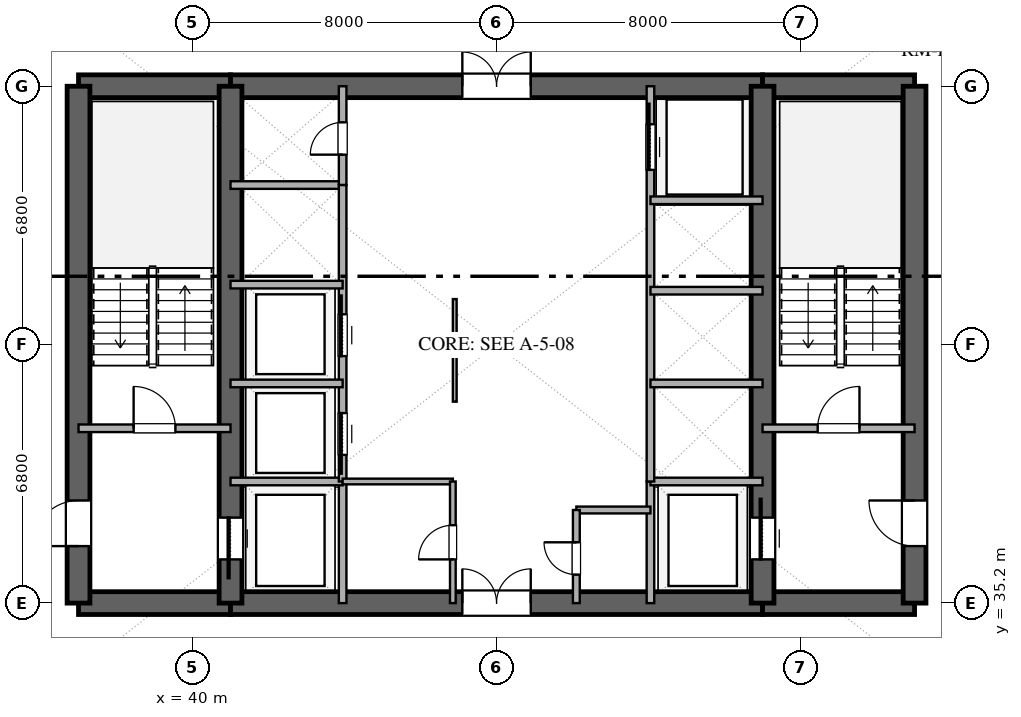
"""IFC4 building model, lengths in metres.
Left out: names, types, materials, properties, quantities, classifications, styles, units other than length and angle.
Written with IfcOpenShell. Run it as: python <this file> out.ifc"""

import sys

from ifc_helpers import new_model, si_unit, direction, frame, frame_2d, origin, place, context, subcontext, project, spatial, rectangle, extrude, element, fill, save


model = new_model("IFC4")
c1 = context("Model", 3, precision=1e-05, world=origin(), true_north=direction((0.0, 1.0)))
c2 = subcontext(c1, "Body", "Model", "MODEL_VIEW")
j1 = project(units=[si_unit("LENGTHUNIT", "METRE"), si_unit("PLANEANGLEUNIT", "RADIAN")], contexts=[c1])
p1 = place(None, origin())
s1 = spatial("IfcSite", under=j1, at=p1, CompositionType="ELEMENT")
p2 = place(p1, origin())
s2 = spatial("IfcBuilding", under=s1, at=p2, CompositionType="ELEMENT")
p3 = place(p2, frame((0.0, 0.0, 28.2)))
s3 = spatial("IfcBuildingStorey", under=s2, at=p3, CompositionType="ELEMENT", Elevation=28.2)
p4 = place(p3, frame((37.0, 35.2, 0.0), z_axis=(0.0, 0.0, 1.0), x_axis=(1.0, 0.0, 0.0)))
e1 = element("IfcWall", 1, at=p4, inside=s3, PredefinedType="SHEAR", context=c2, shape_type="SweptSolid", body=[
    extrude(rectangle(XDim=4.0, YDim=0.6, at=frame_2d((2.0, 0.0))), origin(), (0.0, 0.0, 1.0), 3.38),
])
p5 = place(p3, frame((41.0, 35.2, 0.0), z_axis=(0.0, 0.0, 1.0), x_axis=(1.0, 0.0, 0.0)))
e2 = element("IfcWall", 2, at=p5, inside=s3, PredefinedType="SHEAR", context=c2, shape_type="SweptSolid", body=[
    extrude(rectangle(XDim=14.0, YDim=0.6, at=frame_2d((7.0, 0.0))), origin(), (0.0, 0.0, 1.0), 3.38),
])
p6 = place(p5, frame((6.1, 0.0, 0.0)))
e3 = element("IfcOpeningElement", 3, at=p6, cuts=e2, PredefinedType="OPENING", context=c2, shape_type="SweptSolid", body=[
    extrude(rectangle(XDim=1.8, YDim=2.25, at=frame_2d((0.9, 1.125))), frame((0.0, 0.31, 0.0), z_axis=(0.0, -1.0, 0.0), x_axis=(1.0, 0.0, 0.0)), (0.0, 0.0, 1.0), 0.62),
])
for number, where, z_axis, x_axis in (
    (4, (55.0, 35.2, 0.0), (0.0, 0.0, 1.0), (1.0, 0.0, 0.0)),
    (5, (37.0, 48.8, 0.0), (0.0, 0.0, 1.0), (1.0, 0.0, 0.0)),
):
    element("IfcWall", number, at=place(p3, frame(where, z_axis=z_axis, x_axis=x_axis)), inside=s3, PredefinedType="SHEAR", context=c2, shape_type="SweptSolid", body=[
        extrude(rectangle(XDim=4.0, YDim=0.6, at=frame_2d((2.0, 0.0))), origin(), (0.0, 0.0, 1.0), 3.38),
    ])
p7 = place(p3, frame((41.0, 48.8, 0.0), z_axis=(0.0, 0.0, 1.0), x_axis=(1.0, 0.0, 0.0)))
e6 = element("IfcWall", 6, at=p7, inside=s3, PredefinedType="SHEAR", context=c2, shape_type="SweptSolid", body=[
    extrude(rectangle(XDim=14.0, YDim=0.6, at=frame_2d((7.0, 0.0))), origin(), (0.0, 0.0, 1.0), 3.38),
])
p8 = place(p7, frame((6.1, 0.0, 0.0)))
e7 = element("IfcOpeningElement", 7, at=p8, cuts=e6, PredefinedType="OPENING", context=c2, shape_type="SweptSolid", body=[
    extrude(rectangle(XDim=1.8, YDim=2.25, at=frame_2d((0.9, 1.125))), frame((0.0, 0.31, 0.0), z_axis=(0.0, -1.0, 0.0), x_axis=(1.0, 0.0, 0.0)), (0.0, 0.0, 1.0), 0.62),
])
p9 = place(p3, frame((55.0, 48.8, 0.0), z_axis=(0.0, 0.0, 1.0), x_axis=(1.0, 0.0, 0.0)))
e8 = element("IfcWall", 8, at=p9, inside=s3, PredefinedType="SHEAR", context=c2, shape_type="SweptSolid", body=[
    extrude(rectangle(XDim=4.0, YDim=0.6, at=frame_2d((2.0, 0.0))), origin(), (0.0, 0.0, 1.0), 3.38),
])
p10 = place(p3, frame((37.0, 35.2, 0.0), z_axis=(0.0, 0.0, 1.0), x_axis=(0.0, 1.0, 0.0)))
e9 = element("IfcWall", 9, at=p10, inside=s3, PredefinedType="SHEAR", context=c2, shape_type="SweptSolid", body=[
    extrude(rectangle(XDim=13.6, YDim=0.6, at=frame_2d((6.8, 0.0))), origin(), (0.0, 0.0, 1.0), 3.38),
])
p11 = place(p10, frame((1.5, 0.0, 0.0)))
e10 = element("IfcOpeningElement", 10, at=p11, cuts=e9, PredefinedType="OPENING", context=c2, shape_type="SweptSolid", body=[
    extrude(rectangle(XDim=1.2, YDim=2.15, at=frame_2d((0.6, 1.075))), frame((0.0, 0.31, 0.0), z_axis=(0.0, -1.0, 0.0), x_axis=(1.0, 0.0, 0.0)), (0.0, 0.0, 1.0), 0.62),
])
p12 = place(p3, frame((59.0, 35.2, 0.0), z_axis=(0.0, 0.0, 1.0), x_axis=(0.0, 1.0, 0.0)))
e11 = element("IfcWall", 11, at=p12, inside=s3, PredefinedType="SHEAR", context=c2, shape_type="SweptSolid", body=[
    extrude(rectangle(XDim=13.6, YDim=0.6, at=frame_2d((6.8, 0.0))), origin(), (0.0, 0.0, 1.0), 3.38),
])
p13 = place(p12, frame((1.5, 0.0, 0.0)))
e12 = element("IfcOpeningElement", 12, at=p13, cuts=e11, PredefinedType="OPENING", context=c2, shape_type="SweptSolid", body=[
    extrude(rectangle(XDim=1.2, YDim=2.15, at=frame_2d((0.6, 1.075))), frame((0.0, 0.31, 0.0), z_axis=(0.0, -1.0, 0.0), x_axis=(1.0, 0.0, 0.0)), (0.0, 0.0, 1.0), 0.62),
])
p14 = place(p3, frame((41.0, 35.2, 0.0), z_axis=(0.0, 0.0, 1.0), x_axis=(0.0, 1.0, 0.0)))
e13 = element("IfcWall", 13, at=p14, inside=s3, PredefinedType="SHEAR", context=c2, shape_type="SweptSolid", body=[
    extrude(rectangle(XDim=13.6, YDim=0.6, at=frame_2d((6.8, 0.0))), origin(), (0.0, 0.0, 1.0), 3.38),
])
p15 = place(p14, frame((1.15, 0.0, 0.0)))
e14 = element("IfcOpeningElement", 14, at=p15, cuts=e13, PredefinedType="OPENING", context=c2, shape_type="SweptSolid", body=[
    extrude(rectangle(XDim=1.1, YDim=2.2, at=frame_2d((0.55, 1.1))), frame((0.0, 0.31, 0.0), z_axis=(0.0, -1.0, 0.0), x_axis=(1.0, 0.0, 0.0)), (0.0, 0.0, 1.0), 0.62),
])
p16 = place(p3, frame((55.0, 35.2, 0.0), z_axis=(0.0, 0.0, 1.0), x_axis=(0.0, 1.0, 0.0)))
e15 = element("IfcWall", 15, at=p16, inside=s3, PredefinedType="SHEAR", context=c2, shape_type="SweptSolid", body=[
    extrude(rectangle(XDim=13.6, YDim=0.6, at=frame_2d((6.8, 0.0))), origin(), (0.0, 0.0, 1.0), 3.38),
])
p17 = place(p16, frame((1.15, 0.0, 0.0)))
e16 = element("IfcOpeningElement", 16, at=p17, cuts=e15, PredefinedType="OPENING", context=c2, shape_type="SweptSolid", body=[
    extrude(rectangle(XDim=1.1, YDim=2.2, at=frame_2d((0.55, 1.1))), frame((0.0, 0.31, 0.0), z_axis=(0.0, -1.0, 0.0), x_axis=(1.0, 0.0, 0.0)), (0.0, 0.0, 1.0), 0.62),
])
p18 = place(p3, frame((37.0, 39.8, 0.0), z_axis=(0.0, 0.0, 1.0), x_axis=(1.0, 0.0, 0.0)))
e17 = element("IfcWall", 17, at=p18, inside=s3, PredefinedType="SOLIDWALL", context=c2, shape_type="SweptSolid", body=[
    extrude(rectangle(XDim=4.0, YDim=0.2, at=frame_2d((2.0, 0.0))), origin(), (0.0, 0.0, 1.0), 2.74),
])
p19 = place(p18, frame((1.45, 0.0, 0.0)))
e18 = element("IfcOpeningElement", 18, at=p19, cuts=e17, PredefinedType="OPENING", context=c2, shape_type="SweptSolid", body=[
    extrude(rectangle(XDim=1.1, YDim=2.15, at=frame_2d((0.55, 1.075))), frame((0.0, 0.11, 0.0), z_axis=(0.0, -1.0, 0.0), x_axis=(1.0, 0.0, 0.0)), (0.0, 0.0, 1.0), 0.22),
])
p20 = place(p3, frame((55.0, 39.8, 0.0), z_axis=(0.0, 0.0, 1.0), x_axis=(1.0, 0.0, 0.0)))
e19 = element("IfcWall", 19, at=p20, inside=s3, PredefinedType="SOLIDWALL", context=c2, shape_type="SweptSolid", body=[
    extrude(rectangle(XDim=4.0, YDim=0.2, at=frame_2d((2.0, 0.0))), origin(), (0.0, 0.0, 1.0), 2.74),
])
p21 = place(p20, frame((1.45, 0.0, 0.0)))
e20 = element("IfcOpeningElement", 20, at=p21, cuts=e19, PredefinedType="OPENING", context=c2, shape_type="SweptSolid", body=[
    extrude(rectangle(XDim=1.1, YDim=2.15, at=frame_2d((0.55, 1.075))), frame((0.0, 0.11, 0.0), z_axis=(0.0, -1.0, 0.0), x_axis=(1.0, 0.0, 0.0)), (0.0, 0.0, 1.0), 0.22),
])
p22 = place(p3, frame((43.95, 35.2, 0.0), z_axis=(0.0, 0.0, 1.0), x_axis=(0.0, 1.0, 0.0)))
e21 = element("IfcWall", 21, at=p22, inside=s3, PredefinedType="SOLIDWALL", context=c2, shape_type="SweptSolid", body=[
    extrude(rectangle(XDim=3.2, YDim=0.2, at=frame_2d((1.6, 0.0))), origin(), (0.0, 0.0, 1.0), 2.74),
])
p23 = place(p3, frame((41.0, 38.4, 0.0), z_axis=(0.0, 0.0, 1.0), x_axis=(1.0, 0.0, 0.0)))
e22 = element("IfcWall", 22, at=p23, inside=s3, PredefinedType="SOLIDWALL", context=c2, shape_type="SweptSolid", body=[
    extrude(rectangle(XDim=2.95, YDim=0.2, at=frame_2d((1.475, 0.0))), origin(), (0.0, 0.0, 1.0), 2.74),
])
p24 = place(p3, frame((52.05, 35.2, 0.0), z_axis=(0.0, 0.0, 1.0), x_axis=(0.0, 1.0, 0.0)))
e23 = element("IfcWall", 23, at=p24, inside=s3, PredefinedType="SOLIDWALL", context=c2, shape_type="SweptSolid", body=[
    extrude(rectangle(XDim=3.2, YDim=0.2, at=frame_2d((1.6, 0.0))), origin(), (0.0, 0.0, 1.0), 2.74),
])
for number, where, z_axis, x_axis in (
    (24, (52.05, 38.4, 0.0), (0.0, 0.0, 1.0), (1.0, 0.0, 0.0)),
    (25, (41.0, 46.2, 0.0), (0.0, 0.0, 1.0), (1.0, 0.0, 0.0)),
):
    element("IfcWall", number, at=place(p3, frame(where, z_axis=z_axis, x_axis=x_axis)), inside=s3, PredefinedType="SOLIDWALL", context=c2, shape_type="SweptSolid", body=[
        extrude(rectangle(XDim=2.95, YDim=0.2, at=frame_2d((1.475, 0.0))), origin(), (0.0, 0.0, 1.0), 2.74),
    ])
p25 = place(p3, frame((43.95, 46.2, 0.0), z_axis=(0.0, 0.0, 1.0), x_axis=(0.0, 1.0, 0.0)))
e26 = element("IfcWall", 26, at=p25, inside=s3, PredefinedType="SOLIDWALL", context=c2, shape_type="SweptSolid", body=[
    extrude(rectangle(XDim=2.6, YDim=0.2, at=frame_2d((1.3, 0.0))), origin(), (0.0, 0.0, 1.0), 2.74),
])
p26 = place(p25, frame((0.8, 0.0, 0.0)))
e27 = element("IfcOpeningElement", 27, at=p26, cuts=e26, PredefinedType="OPENING", context=c2, shape_type="SweptSolid", body=[
    extrude(rectangle(XDim=0.85, YDim=2.15, at=frame_2d((0.425, 1.075))), frame((0.0, 0.11, 0.0), z_axis=(0.0, -1.0, 0.0), x_axis=(1.0, 0.0, 0.0)), (0.0, 0.0, 1.0), 0.22),
])
p27 = place(p3, frame((43.95, 38.4, 0.0), z_axis=(0.0, 0.0, 1.0), x_axis=(0.0, 1.0, 0.0)))
e28 = element("IfcWall", 28, at=p27, inside=s3, PredefinedType="SOLIDWALL", context=c2, shape_type="SweptSolid", body=[
    extrude(rectangle(XDim=7.8, YDim=0.2, at=frame_2d((3.9, 0.0))), origin(), (0.0, 0.0, 1.0), 2.74),
])
p28 = place(p27, frame((0.7, 0.0, 0.0)))
e29 = element("IfcOpeningElement", 29, at=p28, cuts=e28, PredefinedType="OPENING", context=c2, shape_type="SweptSolid", body=[
    extrude(rectangle(XDim=1.1, YDim=2.2, at=frame_2d((0.55, 1.1))), frame((0.0, 0.11, 0.0), z_axis=(0.0, -1.0, 0.0), x_axis=(1.0, 0.0, 0.0)), (0.0, 0.0, 1.0), 0.22),
])
p29 = place(p27, frame((3.3, 0.0, 0.0)))
e30 = element("IfcOpeningElement", 30, at=p29, cuts=e28, PredefinedType="OPENING", context=c2, shape_type="SweptSolid", body=[
    extrude(rectangle(XDim=1.1, YDim=2.2, at=frame_2d((0.55, 1.1))), frame((0.0, 0.11, 0.0), z_axis=(0.0, -1.0, 0.0), x_axis=(1.0, 0.0, 0.0)), (0.0, 0.0, 1.0), 0.22),
])
for number, where, z_axis, x_axis in (
    (31, (41.0, 40.98, 0.0), (0.0, 0.0, 1.0), (1.0, 0.0, 0.0)),
    (32, (41.0, 43.58, 0.0), (0.0, 0.0, 1.0), (1.0, 0.0, 0.0)),
):
    element("IfcWall", number, at=place(p3, frame(where, z_axis=z_axis, x_axis=x_axis)), inside=s3, PredefinedType="SOLIDWALL", context=c2, shape_type="SweptSolid", body=[
        extrude(rectangle(XDim=2.95, YDim=0.2, at=frame_2d((1.475, 0.0))), origin(), (0.0, 0.0, 1.0), 2.74),
    ])
p30 = place(p3, frame((52.05, 38.4, 0.0), z_axis=(0.0, 0.0, 1.0), x_axis=(0.0, 1.0, 0.0)))
e33 = element("IfcWall", 33, at=p30, inside=s3, PredefinedType="SOLIDWALL", context=c2, shape_type="SweptSolid", body=[
    extrude(rectangle(XDim=10.4, YDim=0.2, at=frame_2d((5.2, 0.0))), origin(), (0.0, 0.0, 1.0), 2.74),
])
p31 = place(p30, frame((8.2, 0.0, 0.0)))
e34 = element("IfcOpeningElement", 34, at=p31, cuts=e33, PredefinedType="OPENING", context=c2, shape_type="SweptSolid", body=[
    extrude(rectangle(XDim=1.2, YDim=2.2, at=frame_2d((0.6, 1.1))), frame((0.0, 0.11, 0.0), z_axis=(0.0, -1.0, 0.0), x_axis=(1.0, 0.0, 0.0)), (0.0, 0.0, 1.0), 0.22),
])
for number, where, z_axis, x_axis in (
    (35, (52.05, 40.98, 0.0), (0.0, 0.0, 1.0), (1.0, 0.0, 0.0)),
    (36, (52.05, 43.42, 0.0), (0.0, 0.0, 1.0), (1.0, 0.0, 0.0)),
    (37, (52.05, 45.8, 0.0), (0.0, 0.0, 1.0), (1.0, 0.0, 0.0)),
):
    element("IfcWall", number, at=place(p3, frame(where, z_axis=z_axis, x_axis=x_axis)), inside=s3, PredefinedType="SOLIDWALL", context=c2, shape_type="SweptSolid", body=[
        extrude(rectangle(XDim=2.95, YDim=0.2, at=frame_2d((1.475, 0.0))), origin(), (0.0, 0.0, 1.0), 2.74),
    ])
p32 = place(p3, frame((43.95, 38.4, 0.0), z_axis=(0.0, 0.0, 1.0), x_axis=(1.0, 0.0, 0.0)))
e38 = element("IfcWall", 38, at=p32, inside=s3, PredefinedType="PARTITIONING", context=c2, shape_type="SweptSolid", body=[
    extrude(rectangle(XDim=2.9, YDim=0.15, at=frame_2d((1.45, 0.0))), origin(), (0.0, 0.0, 1.0), 2.74),
])
p33 = place(p3, frame((46.85, 35.2, 0.0), z_axis=(0.0, 0.0, 1.0), x_axis=(0.0, 1.0, 0.0)))
e39 = element("IfcWall", 39, at=p33, inside=s3, PredefinedType="PARTITIONING", context=c2, shape_type="SweptSolid", body=[
    extrude(rectangle(XDim=3.2, YDim=0.15, at=frame_2d((1.6, 0.0))), origin(), (0.0, 0.0, 1.0), 2.74),
])
p34 = place(p33, frame((1.15, 0.0, 0.0)))
e40 = element("IfcOpeningElement", 40, at=p34, cuts=e39, PredefinedType="OPENING", context=c2, shape_type="SweptSolid", body=[
    extrude(rectangle(XDim=0.9, YDim=2.15, at=frame_2d((0.45, 1.075))), frame((0.0, 0.085, 0.0), z_axis=(0.0, -1.0, 0.0), x_axis=(1.0, 0.0, 0.0)), (0.0, 0.0, 1.0), 0.17),
])
p35 = place(p3, frame((50.1, 37.65, 0.0), z_axis=(0.0, 0.0, 1.0), x_axis=(1.0, 0.0, 0.0)))
e41 = element("IfcWall", 41, at=p35, inside=s3, PredefinedType="PLUMBINGWALL", context=c2, shape_type="SweptSolid", body=[
    extrude(rectangle(XDim=1.95, YDim=0.18, at=frame_2d((0.975, 0.0))), origin(), (0.0, 0.0, 1.0), 2.74),
])
p36 = place(p3, frame((50.1, 35.2, 0.0), z_axis=(0.0, 0.0, 1.0), x_axis=(0.0, 1.0, 0.0)))
e42 = element("IfcWall", 42, at=p36, inside=s3, PredefinedType="PLUMBINGWALL", context=c2, shape_type="SweptSolid", body=[
    extrude(rectangle(XDim=2.45, YDim=0.18, at=frame_2d((1.225, 0.0))), origin(), (0.0, 0.0, 1.0), 2.74),
])
p37 = place(p36, frame((0.75, 0.0, 0.0)))
e43 = element("IfcOpeningElement", 43, at=p37, cuts=e42, PredefinedType="OPENING", context=c2, shape_type="SweptSolid", body=[
    extrude(rectangle(XDim=0.85, YDim=2.1, at=frame_2d((0.425, 1.05))), frame((0.0, 0.1, 0.0), z_axis=(0.0, -1.0, 0.0), x_axis=(1.0, 0.0, 0.0)), (0.0, 0.0, 1.0), 0.2),
])
p38 = place(p3, frame((46.9, 40.5, 0.0), z_axis=(0.0, 0.0, 1.0), x_axis=(0.0, 1.0, 0.0)))
e44 = element("IfcWall", 44, at=p38, inside=s3, PredefinedType="MOVABLE", context=c2, shape_type="SweptSolid", body=[
    extrude(rectangle(XDim=2.7, YDim=0.1, at=frame_2d((1.35, 0.0))), origin(), (0.0, 0.0, 1.0), 2.74),
])
p39 = place(p15, origin())
e45 = element("IfcDoor", 45, at=p39, inside=s3, OperationType="SLIDING_TO_LEFT", PredefinedType="DOOR", context=c2, shape_type="SweptSolid", body=[
    extrude(rectangle(XDim=1.1, YDim=2.2, at=frame_2d((0.55, 1.1))), frame((0.0, 0.025, 0.0), z_axis=(0.0, -1.0, 0.0), x_axis=(1.0, 0.0, 0.0)), (0.0, 0.0, 1.0), 0.05),
])
fill(e14, e45)
p40 = place(p17, origin())
e46 = element("IfcDoor", 46, at=p40, inside=s3, OperationType="SLIDING_TO_RIGHT", PredefinedType="DOOR", context=c2, shape_type="SweptSolid", body=[
    extrude(rectangle(XDim=1.1, YDim=2.2, at=frame_2d((0.55, 1.1))), frame((0.0, 0.025, 0.0), z_axis=(0.0, -1.0, 0.0), x_axis=(1.0, 0.0, 0.0)), (0.0, 0.0, 1.0), 0.05),
])
fill(e16, e46)
p41 = place(p11, origin())
e47 = element("IfcDoor", 47, at=p41, inside=s3, OperationType="SINGLE_SWING_LEFT", PredefinedType="DOOR", context=c2, shape_type="SweptSolid", body=[
    extrude(rectangle(XDim=1.2, YDim=2.15, at=frame_2d((0.6, 1.075))), frame((0.0, 0.025, 0.0), z_axis=(0.0, -1.0, 0.0), x_axis=(1.0, 0.0, 0.0)), (0.0, 0.0, 1.0), 0.05),
])
fill(e10, e47)
p42 = place(p13, origin())
e48 = element("IfcDoor", 48, at=p42, inside=s3, OperationType="SINGLE_SWING_RIGHT", PredefinedType="DOOR", context=c2, shape_type="SweptSolid", body=[
    extrude(rectangle(XDim=1.2, YDim=2.15, at=frame_2d((0.6, 1.075))), frame((0.0, 0.025, 0.0), z_axis=(0.0, -1.0, 0.0), x_axis=(1.0, 0.0, 0.0)), (0.0, 0.0, 1.0), 0.05),
])
fill(e12, e48)
p43 = place(p6, origin())
e49 = element("IfcDoor", 49, at=p43, inside=s3, OperationType="DOUBLE_DOOR_SINGLE_SWING", PredefinedType="DOOR", context=c2, shape_type="SweptSolid", body=[
    extrude(rectangle(XDim=1.8, YDim=2.25, at=frame_2d((0.9, 1.125))), frame((0.0, 0.025, 0.0), z_axis=(0.0, -1.0, 0.0), x_axis=(1.0, 0.0, 0.0)), (0.0, 0.0, 1.0), 0.05),
])
fill(e3, e49)
p44 = place(p8, origin())
e50 = element("IfcDoor", 50, at=p44, inside=s3, OperationType="DOUBLE_DOOR_SINGLE_SWING", PredefinedType="DOOR", context=c2, shape_type="SweptSolid", body=[
    extrude(rectangle(XDim=1.8, YDim=2.25, at=frame_2d((0.9, 1.125))), frame((0.0, 0.025, 0.0), z_axis=(0.0, -1.0, 0.0), x_axis=(1.0, 0.0, 0.0)), (0.0, 0.0, 1.0), 0.05),
])
fill(e7, e50)
p45 = place(p19, origin())
e51 = element("IfcDoor", 51, at=p45, inside=s3, OperationType="SINGLE_SWING_LEFT", PredefinedType="DOOR", context=c2, shape_type="SweptSolid", body=[
    extrude(rectangle(XDim=1.1, YDim=2.15, at=frame_2d((0.55, 1.075))), frame((0.0, 0.025, 0.0), z_axis=(0.0, -1.0, 0.0), x_axis=(1.0, 0.0, 0.0)), (0.0, 0.0, 1.0), 0.05),
])
fill(e18, e51)
p46 = place(p21, origin())
e52 = element("IfcDoor", 52, at=p46, inside=s3, OperationType="SINGLE_SWING_RIGHT", PredefinedType="DOOR", context=c2, shape_type="SweptSolid", body=[
    extrude(rectangle(XDim=1.1, YDim=2.15, at=frame_2d((0.55, 1.075))), frame((0.0, 0.025, 0.0), z_axis=(0.0, -1.0, 0.0), x_axis=(1.0, 0.0, 0.0)), (0.0, 0.0, 1.0), 0.05),
])
fill(e20, e52)
p47 = place(p26, origin())
e53 = element("IfcDoor", 53, at=p47, inside=s3, OperationType="SINGLE_SWING_LEFT", PredefinedType="DOOR", context=c2, shape_type="SweptSolid", body=[
    extrude(rectangle(XDim=0.85, YDim=2.15, at=frame_2d((0.425, 1.075))), frame((0.0, 0.025, 0.0), z_axis=(0.0, -1.0, 0.0), x_axis=(1.0, 0.0, 0.0)), (0.0, 0.0, 1.0), 0.05),
])
fill(e27, e53)
p48 = place(p28, origin())
e54 = element("IfcDoor", 54, at=p48, inside=s3, OperationType="SLIDING_TO_LEFT", PredefinedType="DOOR", context=c2, shape_type="SweptSolid", body=[
    extrude(rectangle(XDim=1.1, YDim=2.2, at=frame_2d((0.55, 1.1))), frame((0.0, 0.025, 0.0), z_axis=(0.0, -1.0, 0.0), x_axis=(1.0, 0.0, 0.0)), (0.0, 0.0, 1.0), 0.05),
])
fill(e29, e54)
p49 = place(p29, origin())
e55 = element("IfcDoor", 55, at=p49, inside=s3, OperationType="SLIDING_TO_RIGHT", PredefinedType="DOOR", context=c2, shape_type="SweptSolid", body=[
    extrude(rectangle(XDim=1.1, YDim=2.2, at=frame_2d((0.55, 1.1))), frame((0.0, 0.025, 0.0), z_axis=(0.0, -1.0, 0.0), x_axis=(1.0, 0.0, 0.0)), (0.0, 0.0, 1.0), 0.05),
])
fill(e30, e55)
p50 = place(p31, origin())
e56 = element("IfcDoor", 56, at=p50, inside=s3, OperationType="SLIDING_TO_RIGHT", PredefinedType="DOOR", context=c2, shape_type="SweptSolid", body=[
    extrude(rectangle(XDim=1.2, YDim=2.2, at=frame_2d((0.6, 1.1))), frame((0.0, 0.025, 0.0), z_axis=(0.0, -1.0, 0.0), x_axis=(1.0, 0.0, 0.0)), (0.0, 0.0, 1.0), 0.05),
])
fill(e34, e56)
p51 = place(p34, origin())
e57 = element("IfcDoor", 57, at=p51, inside=s3, OperationType="SINGLE_SWING_LEFT", PredefinedType="DOOR", context=c2, shape_type="SweptSolid", body=[
    extrude(rectangle(XDim=0.9, YDim=2.15, at=frame_2d((0.45, 1.075))), frame((0.0, 0.025, 0.0), z_axis=(0.0, -1.0, 0.0), x_axis=(1.0, 0.0, 0.0)), (0.0, 0.0, 1.0), 0.05),
])
fill(e40, e57)
p52 = place(p37, origin())
e58 = element("IfcDoor", 58, at=p52, inside=s3, OperationType="SINGLE_SWING_RIGHT", PredefinedType="DOOR", context=c2, shape_type="SweptSolid", body=[
    extrude(rectangle(XDim=0.85, YDim=2.1, at=frame_2d((0.425, 1.05))), frame((0.0, 0.025, 0.0), z_axis=(0.0, -1.0, 0.0), x_axis=(1.0, 0.0, 0.0)), (0.0, 0.0, 1.0), 0.05),
])
fill(e43, e58)
save(model, sys.argv[1])
